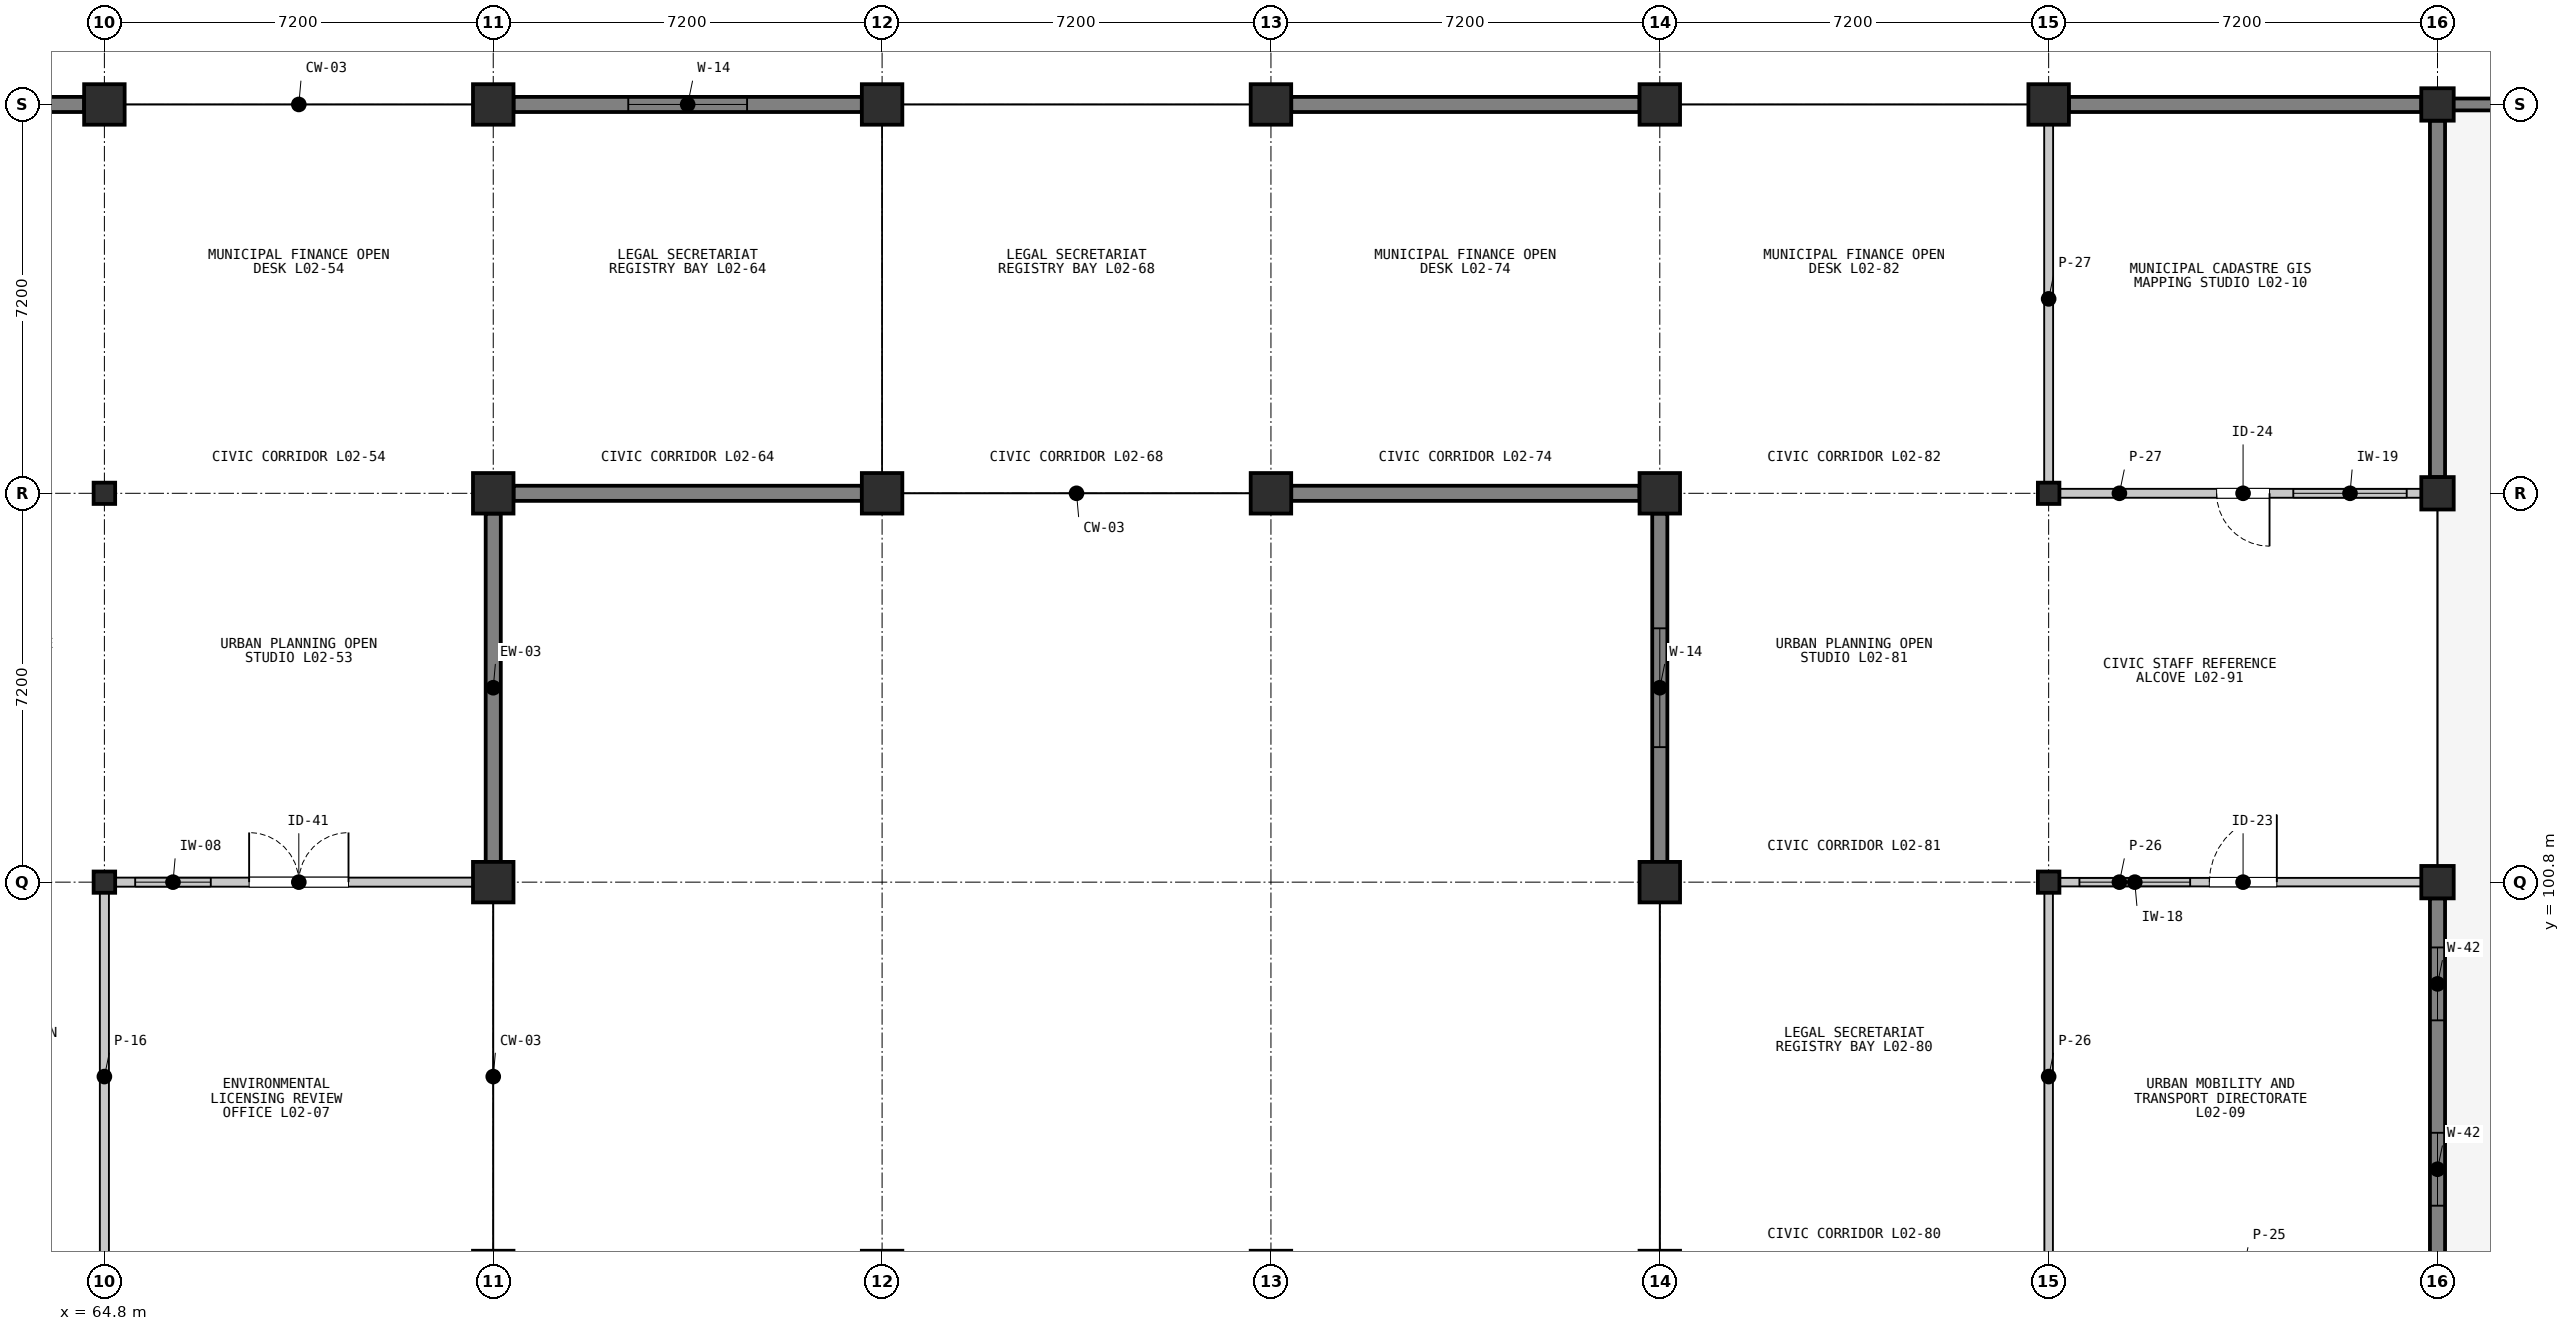
"""IFC4 building model, lengths in metres.
Left out: names, types, materials, properties, quantities, classifications, styles, units other than length and angle.
Written with IfcOpenShell. Run it as: python <this file> out.ifc"""

import sys

from ifc_helpers import new_model, si_unit, direction, frame, frame_2d, origin, origin_2d, place, context, subcontext, project, spatial, rectangle, i_section, extrude, element, fill, save


model = new_model("IFC4")
c1 = context("Model", 3, precision=1e-05, world=origin(), true_north=direction((0.0, 1.0)))
c2 = subcontext(c1, "Body", "Model", "MODEL_VIEW")
j1 = project(units=[si_unit("LENGTHUNIT", "METRE"), si_unit("PLANEANGLEUNIT", "RADIAN")], contexts=[c1])
p1 = place(None, origin())
s1 = spatial("IfcSite", under=j1, at=p1, CompositionType="ELEMENT")
p2 = place(p1, origin())
s2 = spatial("IfcBuilding", under=s1, at=p2, CompositionType="ELEMENT")
p3 = place(p2, frame((0.0, 0.0, 5.4)))
s3 = spatial("IfcBuildingStorey", under=s2, at=p3, CompositionType="ELEMENT", Elevation=5.4)
for number, where, z_axis, x_axis in (
    (1, (64.8, 100.8, 0.0), (0.0, 0.0, 1.0), (1.0, 0.0, 0.0)),
    (2, (64.8, 108.0, 0.0), (0.0, 0.0, 1.0), (1.0, 0.0, 0.0)),
):
    element("IfcColumn", number, at=place(p3, frame(where, z_axis=z_axis, x_axis=x_axis)), inside=s3, PredefinedType="COLUMN", context=c2, shape_type="SweptSolid", body=[
        extrude(i_section(OverallWidth=0.399, OverallDepth=0.394, WebThickness=0.023, FlangeThickness=0.037, FilletRadius=0.015, at=origin_2d()), origin(), (0.0, 0.0, 1.0), 4.5),
    ])
for number, where, z_axis, x_axis in (
    (3, (64.8, 115.2, 0.0), (0.0, 0.0, 1.0), (1.0, 0.0, 0.0)),
    (4, (72.0, 93.6, 0.0), (0.0, 0.0, 1.0), (1.0, 0.0, 0.0)),
    (5, (72.0, 100.8, 0.0), (0.0, 0.0, 1.0), (1.0, 0.0, 0.0)),
    (6, (72.0, 108.0, 0.0), (0.0, 0.0, 1.0), (1.0, 0.0, 0.0)),
    (7, (72.0, 115.2, 0.0), (0.0, 0.0, 1.0), (1.0, 0.0, 0.0)),
    (8, (79.2, 93.6, 0.0), (0.0, 0.0, 1.0), (1.0, 0.0, 0.0)),
    (9, (79.2, 108.0, 0.0), (0.0, 0.0, 1.0), (1.0, 0.0, 0.0)),
    (10, (79.2, 115.2, 0.0), (0.0, 0.0, 1.0), (1.0, 0.0, 0.0)),
    (11, (86.4, 93.6, 0.0), (0.0, 0.0, 1.0), (1.0, 0.0, 0.0)),
    (12, (86.4, 108.0, 0.0), (0.0, 0.0, 1.0), (1.0, 0.0, 0.0)),
    (13, (86.4, 115.2, 0.0), (0.0, 0.0, 1.0), (1.0, 0.0, 0.0)),
    (14, (93.6, 93.6, 0.0), (0.0, 0.0, 1.0), (1.0, 0.0, 0.0)),
    (15, (93.6, 100.8, 0.0), (0.0, 0.0, 1.0), (1.0, 0.0, 0.0)),
    (16, (93.6, 108.0, 0.0), (0.0, 0.0, 1.0), (1.0, 0.0, 0.0)),
    (17, (93.6, 115.2, 0.0), (0.0, 0.0, 1.0), (1.0, 0.0, 0.0)),
):
    element("IfcColumn", number, at=place(p3, frame(where, z_axis=z_axis, x_axis=x_axis)), inside=s3, PredefinedType="COLUMN", context=c2, shape_type="SweptSolid", body=[
        extrude(rectangle(XDim=0.75, YDim=0.75, at=origin_2d()), origin(), (0.0, 0.0, 1.0), 4.5),
    ])
for number, where, z_axis, x_axis in (
    (18, (100.8, 100.8, 0.0), (0.0, 0.0, 1.0), (1.0, 0.0, 0.0)),
    (19, (100.8, 108.0, 0.0), (0.0, 0.0, 1.0), (1.0, 0.0, 0.0)),
):
    element("IfcColumn", number, at=place(p3, frame(where, z_axis=z_axis, x_axis=x_axis)), inside=s3, PredefinedType="COLUMN", context=c2, shape_type="SweptSolid", body=[
        extrude(i_section(OverallWidth=0.399, OverallDepth=0.394, WebThickness=0.023, FlangeThickness=0.037, FilletRadius=0.015, at=origin_2d()), origin(), (0.0, 0.0, 1.0), 4.5),
    ])
p4 = place(p3, frame((100.8, 115.2, 0.0), z_axis=(0.0, 0.0, 1.0), x_axis=(1.0, 0.0, 0.0)))
e20 = element("IfcColumn", 20, at=p4, inside=s3, PredefinedType="COLUMN", context=c2, shape_type="SweptSolid", body=[
    extrude(rectangle(XDim=0.75, YDim=0.75, at=origin_2d()), origin(), (0.0, 0.0, 1.0), 4.5),
])
for number, where, z_axis, x_axis in (
    (21, (108.0, 100.8, 0.0), (0.0, 0.0, 1.0), (1.0, 0.0, 0.0)),
    (22, (108.0, 108.0, 0.0), (0.0, 0.0, 1.0), (1.0, 0.0, 0.0)),
    (23, (108.0, 115.2, 0.0), (0.0, 0.0, 1.0), (1.0, 0.0, 0.0)),
):
    element("IfcColumn", number, at=place(p3, frame(where, z_axis=z_axis, x_axis=x_axis)), inside=s3, PredefinedType="COLUMN", context=c2, shape_type="SweptSolid", body=[
        extrude(rectangle(XDim=0.6, YDim=0.6, at=origin_2d()), origin(), (0.0, 0.0, 1.0), 4.5),
    ])
p5 = place(p3, frame((57.975, 115.2, 0.0), z_axis=(0.0, 0.0, 1.0), x_axis=(1.0, 0.0, 0.0)))
e24 = element("IfcWall", 24, at=p5, inside=s3, PredefinedType="SOLIDWALL", context=c2, shape_type="SweptSolid", body=[
    extrude(rectangle(XDim=6.45, YDim=0.28, at=frame_2d((3.225, 0.0))), origin(), (0.0, 0.0, 1.0), 3.698),
])
p6 = place(p3, frame((72.0, 107.625, 0.0), z_axis=(0.0, 0.0, 1.0), x_axis=(0.0, -1.0, 0.0)))
e25 = element("IfcWall", 25, at=p6, inside=s3, PredefinedType="SOLIDWALL", context=c2, shape_type="SweptSolid", body=[
    extrude(rectangle(XDim=6.45, YDim=0.28, at=frame_2d((3.225, 0.0))), origin(), (0.0, 0.0, 1.0), 3.767),
])
p7 = place(p3, frame((78.825, 108.0, 0.0), z_axis=(0.0, 0.0, 1.0), x_axis=(-1.0, 0.0, 0.0)))
e26 = element("IfcWall", 26, at=p7, inside=s3, PredefinedType="SOLIDWALL", context=c2, shape_type="SweptSolid", body=[
    extrude(rectangle(XDim=6.45, YDim=0.28, at=frame_2d((3.225, 0.0))), origin(), (0.0, 0.0, 1.0), 3.698),
])
p8 = place(p3, frame((72.375, 115.2, 0.0), z_axis=(0.0, 0.0, 1.0), x_axis=(1.0, 0.0, 0.0)))
e27 = element("IfcWall", 27, at=p8, inside=s3, PredefinedType="SOLIDWALL", context=c2, shape_type="SweptSolid", body=[
    extrude(rectangle(XDim=6.45, YDim=0.28, at=frame_2d((3.225, 0.0))), origin(), (0.0, 0.0, 1.0), 3.698),
])
p9 = place(p8, frame((2.125, 0.0, 0.95)))
e28 = element("IfcOpeningElement", 28, at=p9, cuts=e27, PredefinedType="OPENING", context=c2, shape_type="SweptSolid", body=[
    extrude(rectangle(XDim=2.2, YDim=1.9, at=frame_2d((1.1, 0.95))), frame((0.0, 0.15, 0.0), z_axis=(0.0, -1.0, 0.0), x_axis=(1.0, 0.0, 0.0)), (0.0, 0.0, 1.0), 0.3),
])
for number, where, z_axis, x_axis in (
    (29, (93.225, 108.0, 0.0), (0.0, 0.0, 1.0), (-1.0, 0.0, 0.0)),
    (30, (86.775, 115.2, 0.0), (0.0, 0.0, 1.0), (1.0, 0.0, 0.0)),
):
    element("IfcWall", number, at=place(p3, frame(where, z_axis=z_axis, x_axis=x_axis)), inside=s3, PredefinedType="SOLIDWALL", context=c2, shape_type="SweptSolid", body=[
        extrude(rectangle(XDim=6.45, YDim=0.28, at=frame_2d((3.225, 0.0))), origin(), (0.0, 0.0, 1.0), 3.698),
    ])
p10 = place(p3, frame((93.6, 101.175, 0.0), z_axis=(0.0, 0.0, 1.0), x_axis=(0.0, 1.0, 0.0)))
e31 = element("IfcWall", 31, at=p10, inside=s3, PredefinedType="SOLIDWALL", context=c2, shape_type="SweptSolid", body=[
    extrude(rectangle(XDim=6.45, YDim=0.28, at=frame_2d((3.225, 0.0))), origin(), (0.0, 0.0, 1.0), 3.767),
])
p11 = place(p10, frame((2.125, 0.0, 0.95)))
e32 = element("IfcOpeningElement", 32, at=p11, cuts=e31, PredefinedType="OPENING", context=c2, shape_type="SweptSolid", body=[
    extrude(rectangle(XDim=2.2, YDim=1.9, at=frame_2d((1.1, 0.95))), frame((0.0, 0.15, 0.0), z_axis=(0.0, -1.0, 0.0), x_axis=(1.0, 0.0, 0.0)), (0.0, 0.0, 1.0), 0.3),
])
p12 = place(p3, frame((108.0, 100.5, 0.0), z_axis=(0.0, 0.0, 1.0), x_axis=(0.0, -1.0, 0.0)))
e33 = element("IfcWall", 33, at=p12, inside=s3, PredefinedType="SOLIDWALL", context=c2, shape_type="SweptSolid", body=[
    extrude(rectangle(XDim=6.6, YDim=0.28, at=frame_2d((3.3, 0.0))), origin(), (0.0, 0.0, 1.0), 3.767),
])
p13 = place(p12, frame((0.909, 0.0, 0.95)))
e34 = element("IfcOpeningElement", 34, at=p13, cuts=e33, PredefinedType="OPENING", context=c2, shape_type="SweptSolid", body=[
    extrude(rectangle(XDim=1.35, YDim=1.85, at=frame_2d((0.675, 0.925))), frame((0.0, 0.15, 0.0), z_axis=(0.0, -1.0, 0.0), x_axis=(1.0, 0.0, 0.0)), (0.0, 0.0, 1.0), 0.3),
])
p14 = place(p12, frame((4.341, 0.0, 0.95)))
e35 = element("IfcOpeningElement", 35, at=p14, cuts=e33, PredefinedType="OPENING", context=c2, shape_type="SweptSolid", body=[
    extrude(rectangle(XDim=1.35, YDim=1.85, at=frame_2d((0.675, 0.925))), frame((0.0, 0.15, 0.0), z_axis=(0.0, -1.0, 0.0), x_axis=(1.0, 0.0, 0.0)), (0.0, 0.0, 1.0), 0.3),
])
p15 = place(p3, frame((101.175, 115.2, 0.0), z_axis=(0.0, 0.0, 1.0), x_axis=(1.0, 0.0, 0.0)))
e36 = element("IfcWall", 36, at=p15, inside=s3, PredefinedType="SOLIDWALL", context=c2, shape_type="SweptSolid", body=[
    extrude(rectangle(XDim=6.525, YDim=0.28, at=frame_2d((3.262, 0.0))), origin(), (0.0, 0.0, 1.0), 3.698),
])
p16 = place(p3, frame((108.0, 114.9, 0.0), z_axis=(0.0, 0.0, 1.0), x_axis=(0.0, -1.0, 0.0)))
e37 = element("IfcWall", 37, at=p16, inside=s3, PredefinedType="SOLIDWALL", context=c2, shape_type="SweptSolid", body=[
    extrude(rectangle(XDim=6.6, YDim=0.28, at=frame_2d((3.3, 0.0))), origin(), (0.0, 0.0, 1.0), 3.767),
])
p17 = place(p3, frame((108.15, 115.2, 0.0), z_axis=(0.0, 0.0, 1.0), x_axis=(1.0, 0.0, 0.0)))
e38 = element("IfcWall", 38, at=p17, inside=s3, PredefinedType="PARAPET", context=c2, shape_type="SweptSolid", body=[
    extrude(rectangle(XDim=6.9, YDim=0.22, at=frame_2d((3.45, 0.0))), origin(), (0.0, 0.0, 1.0), 0.85),
])
p18 = place(p3, frame((64.92, 100.8, 0.0), z_axis=(0.0, 0.0, 1.0), x_axis=(1.0, 0.0, 0.0)))
e39 = element("IfcWall", 39, at=p18, inside=s3, PredefinedType="PARTITIONING", context=c2, shape_type="SweptSolid", body=[
    extrude(rectangle(XDim=6.96, YDim=0.168, at=frame_2d((3.48, 0.0))), origin(), (0.0, 0.0, 1.0), 3.688),
])
p19 = place(p18, frame((2.56, 0.0, 0.0)))
e40 = element("IfcOpeningElement", 40, at=p19, cuts=e39, PredefinedType="OPENING", context=c2, shape_type="SweptSolid", body=[
    extrude(rectangle(XDim=1.84, YDim=2.36, at=frame_2d((0.92, 1.18))), frame((0.0, 0.094, 0.0), z_axis=(0.0, -1.0, 0.0), x_axis=(1.0, 0.0, 0.0)), (0.0, 0.0, 1.0), 0.188),
])
p20 = place(p18, frame((0.45, 0.0, 1.05)))
e41 = element("IfcOpeningElement", 41, at=p20, cuts=e39, PredefinedType="OPENING", context=c2, shape_type="SweptSolid", body=[
    extrude(rectangle(XDim=1.4, YDim=1.2, at=frame_2d((0.7, 0.6))), frame((0.0, 0.094, 0.0), z_axis=(0.0, -1.0, 0.0), x_axis=(1.0, 0.0, 0.0)), (0.0, 0.0, 1.0), 0.188),
])
p21 = place(p3, frame((64.8, 93.72, 0.0), z_axis=(0.0, 0.0, 1.0), x_axis=(0.0, 1.0, 0.0)))
e42 = element("IfcWall", 42, at=p21, inside=s3, PredefinedType="PARTITIONING", context=c2, shape_type="SweptSolid", body=[
    extrude(rectangle(XDim=6.96, YDim=0.168, at=frame_2d((3.48, 0.0))), origin(), (0.0, 0.0, 1.0), 3.688),
])
p22 = place(p3, frame((100.92, 100.8, 0.0), z_axis=(0.0, 0.0, 1.0), x_axis=(1.0, 0.0, 0.0)))
e43 = element("IfcWall", 43, at=p22, inside=s3, PredefinedType="PARTITIONING", context=c2, shape_type="SweptSolid", body=[
    extrude(rectangle(XDim=6.96, YDim=0.158, at=frame_2d((3.48, 0.0))), origin(), (0.0, 0.0, 1.0), 3.688),
])
p23 = place(p22, frame((2.855, 0.0, 0.0)))
e44 = element("IfcOpeningElement", 44, at=p23, cuts=e43, PredefinedType="OPENING", context=c2, shape_type="SweptSolid", body=[
    extrude(rectangle(XDim=1.25, YDim=2.2, at=frame_2d((0.625, 1.1))), frame((0.0, 0.089, 0.0), z_axis=(0.0, -1.0, 0.0), x_axis=(1.0, 0.0, 0.0)), (0.0, 0.0, 1.0), 0.178),
])
p24 = place(p22, frame((0.45, 0.0, 1.05)))
e45 = element("IfcOpeningElement", 45, at=p24, cuts=e43, PredefinedType="OPENING", context=c2, shape_type="SweptSolid", body=[
    extrude(rectangle(XDim=2.05, YDim=1.22, at=frame_2d((1.025, 0.61))), frame((0.0, 0.089, 0.0), z_axis=(0.0, -1.0, 0.0), x_axis=(1.0, 0.0, 0.0)), (0.0, 0.0, 1.0), 0.178),
])
p25 = place(p3, frame((100.8, 93.72, 0.0), z_axis=(0.0, 0.0, 1.0), x_axis=(0.0, 1.0, 0.0)))
e46 = element("IfcWall", 46, at=p25, inside=s3, PredefinedType="PARTITIONING", context=c2, shape_type="SweptSolid", body=[
    extrude(rectangle(XDim=6.96, YDim=0.158, at=frame_2d((3.48, 0.0))), origin(), (0.0, 0.0, 1.0), 3.688),
])
p26 = place(p3, frame((107.88, 108.0, 0.0), z_axis=(0.0, 0.0, 1.0), x_axis=(-1.0, 0.0, 0.0)))
e47 = element("IfcWall", 47, at=p26, inside=s3, PredefinedType="PARTITIONING", context=c2, shape_type="SweptSolid", body=[
    extrude(rectangle(XDim=6.96, YDim=0.165, at=frame_2d((3.48, 0.0))), origin(), (0.0, 0.0, 1.0), 3.688),
])
p27 = place(p26, frame((2.99, 0.0, 0.0)))
e48 = element("IfcOpeningElement", 48, at=p27, cuts=e47, PredefinedType="OPENING", context=c2, shape_type="SweptSolid", body=[
    extrude(rectangle(XDim=0.98, YDim=2.15, at=frame_2d((0.49, 1.075))), frame((0.0, 0.093, 0.0), z_axis=(0.0, -1.0, 0.0), x_axis=(1.0, 0.0, 0.0)), (0.0, 0.0, 1.0), 0.185),
])
p28 = place(p26, frame((0.45, 0.0, 1.05)))
e49 = element("IfcOpeningElement", 49, at=p28, cuts=e47, PredefinedType="OPENING", context=c2, shape_type="SweptSolid", body=[
    extrude(rectangle(XDim=2.1, YDim=1.26, at=frame_2d((1.05, 0.63))), frame((0.0, 0.093, 0.0), z_axis=(0.0, -1.0, 0.0), x_axis=(1.0, 0.0, 0.0)), (0.0, 0.0, 1.0), 0.185),
])
p29 = place(p3, frame((100.8, 108.12, 0.0), z_axis=(0.0, 0.0, 1.0), x_axis=(0.0, 1.0, 0.0)))
e50 = element("IfcWall", 50, at=p29, inside=s3, PredefinedType="PARTITIONING", context=c2, shape_type="SweptSolid", body=[
    extrude(rectangle(XDim=6.96, YDim=0.165, at=frame_2d((3.48, 0.0))), origin(), (0.0, 0.0, 1.0), 3.688),
])
p30 = place(p9, origin())
e51 = element("IfcWindow", 51, at=p30, inside=s3, PartitioningType="SINGLE_PANEL", PredefinedType="WINDOW", context=c2, shape_type="SweptSolid", body=[
    extrude(rectangle(XDim=2.2, YDim=1.9, at=frame_2d((1.1, 0.95))), frame((0.0, 0.03, 0.0), z_axis=(0.0, -1.0, 0.0), x_axis=(1.0, 0.0, 0.0)), (0.0, 0.0, 1.0), 0.06),
])
fill(e28, e51)
p31 = place(p11, origin())
e52 = element("IfcWindow", 52, at=p31, inside=s3, PartitioningType="SINGLE_PANEL", PredefinedType="WINDOW", context=c2, shape_type="SweptSolid", body=[
    extrude(rectangle(XDim=2.2, YDim=1.9, at=frame_2d((1.1, 0.95))), frame((0.0, 0.03, 0.0), z_axis=(0.0, -1.0, 0.0), x_axis=(1.0, 0.0, 0.0)), (0.0, 0.0, 1.0), 0.06),
])
fill(e32, e52)
p32 = place(p13, origin())
e53 = element("IfcWindow", 53, at=p32, inside=s3, PartitioningType="SINGLE_PANEL", PredefinedType="WINDOW", context=c2, shape_type="SweptSolid", body=[
    extrude(rectangle(XDim=1.35, YDim=1.85, at=frame_2d((0.675, 0.925))), frame((0.0, 0.03, 0.0), z_axis=(0.0, -1.0, 0.0), x_axis=(1.0, 0.0, 0.0)), (0.0, 0.0, 1.0), 0.06),
])
fill(e34, e53)
p33 = place(p14, origin())
e54 = element("IfcWindow", 54, at=p33, inside=s3, PartitioningType="SINGLE_PANEL", PredefinedType="WINDOW", context=c2, shape_type="SweptSolid", body=[
    extrude(rectangle(XDim=1.35, YDim=1.85, at=frame_2d((0.675, 0.925))), frame((0.0, 0.03, 0.0), z_axis=(0.0, -1.0, 0.0), x_axis=(1.0, 0.0, 0.0)), (0.0, 0.0, 1.0), 0.06),
])
fill(e35, e54)
p34 = place(p19, origin())
e55 = element("IfcDoor", 55, at=p34, inside=s3, OperationType="DOUBLE_DOOR_SINGLE_SWING", PredefinedType="DOOR", context=c2, shape_type="SweptSolid", body=[
    extrude(rectangle(XDim=1.84, YDim=2.36, at=frame_2d((0.92, 1.18))), frame((0.0, 0.025, 0.0), z_axis=(0.0, -1.0, 0.0), x_axis=(1.0, 0.0, 0.0)), (0.0, 0.0, 1.0), 0.05),
])
fill(e40, e55)
p35 = place(p20, origin())
e56 = element("IfcWindow", 56, at=p35, inside=s3, PartitioningType="SINGLE_PANEL", PredefinedType="WINDOW", context=c2, shape_type="SweptSolid", body=[
    extrude(rectangle(XDim=1.4, YDim=1.2, at=frame_2d((0.7, 0.6))), frame((0.0, 0.03, 0.0), z_axis=(0.0, -1.0, 0.0), x_axis=(1.0, 0.0, 0.0)), (0.0, 0.0, 1.0), 0.06),
])
fill(e41, e56)
p36 = place(p23, origin())
e57 = element("IfcDoor", 57, at=p36, inside=s3, OperationType="SINGLE_SWING_RIGHT", PredefinedType="DOOR", context=c2, shape_type="SweptSolid", body=[
    extrude(rectangle(XDim=1.25, YDim=2.2, at=frame_2d((0.625, 1.1))), frame((0.0, 0.025, 0.0), z_axis=(0.0, -1.0, 0.0), x_axis=(1.0, 0.0, 0.0)), (0.0, 0.0, 1.0), 0.05),
])
fill(e44, e57)
p37 = place(p24, origin())
e58 = element("IfcWindow", 58, at=p37, inside=s3, PartitioningType="SINGLE_PANEL", PredefinedType="WINDOW", context=c2, shape_type="SweptSolid", body=[
    extrude(rectangle(XDim=2.05, YDim=1.22, at=frame_2d((1.025, 0.61))), frame((0.0, 0.03, 0.0), z_axis=(0.0, -1.0, 0.0), x_axis=(1.0, 0.0, 0.0)), (0.0, 0.0, 1.0), 0.06),
])
fill(e45, e58)
p38 = place(p27, origin())
e59 = element("IfcDoor", 59, at=p38, inside=s3, OperationType="SINGLE_SWING_LEFT", PredefinedType="DOOR", context=c2, shape_type="SweptSolid", body=[
    extrude(rectangle(XDim=0.98, YDim=2.15, at=frame_2d((0.49, 1.075))), frame((0.0, 0.025, 0.0), z_axis=(0.0, -1.0, 0.0), x_axis=(1.0, 0.0, 0.0)), (0.0, 0.0, 1.0), 0.05),
])
fill(e48, e59)
p39 = place(p28, origin())
e60 = element("IfcWindow", 60, at=p39, inside=s3, PartitioningType="SINGLE_PANEL", PredefinedType="WINDOW", context=c2, shape_type="SweptSolid", body=[
    extrude(rectangle(XDim=2.1, YDim=1.26, at=frame_2d((1.05, 0.63))), frame((0.0, 0.03, 0.0), z_axis=(0.0, -1.0, 0.0), x_axis=(1.0, 0.0, 0.0)), (0.0, 0.0, 1.0), 0.06),
])
fill(e49, e60)
save(model, sys.argv[1])
